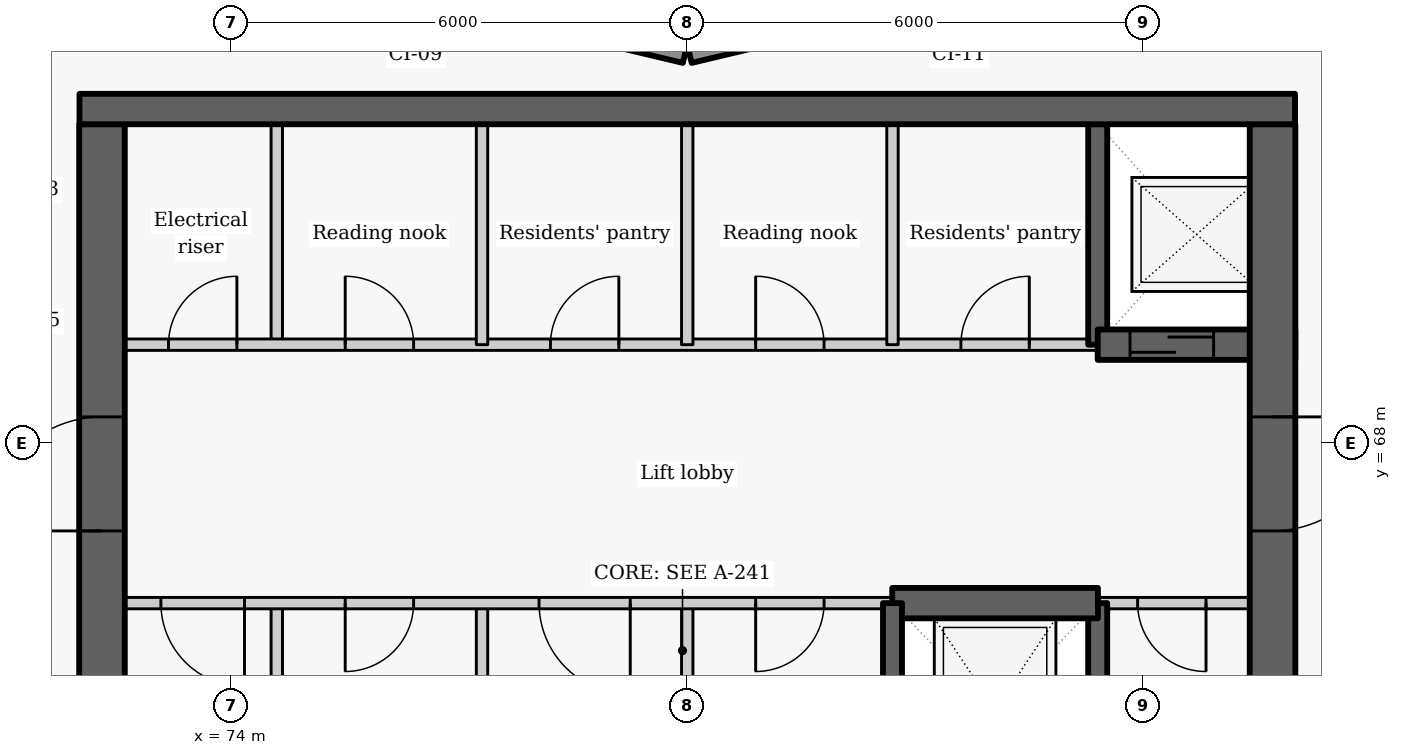
"""IFC4 building model, lengths in metres.
Left out: names, types, materials, properties, quantities, classifications, styles, units other than length and angle.
Written with IfcOpenShell. Run it as: python <this file> out.ifc"""

import sys

from ifc_helpers import new_model, si_unit, direction, frame, frame_2d, origin, place, context, subcontext, project, spatial, rectangle, extrude, element, fill, save


model = new_model("IFC4")
c1 = context("Model", 3, precision=1e-05, world=origin(), true_north=direction((0.0, 1.0)))
c2 = subcontext(c1, "Body", "Model", "MODEL_VIEW")
j1 = project(units=[si_unit("LENGTHUNIT", "METRE"), si_unit("PLANEANGLEUNIT", "RADIAN")], contexts=[c1])
p1 = place(None, origin())
s1 = spatial("IfcSite", under=j1, at=p1, CompositionType="ELEMENT")
p2 = place(p1, origin())
s2 = spatial("IfcBuilding", under=s1, at=p2, CompositionType="ELEMENT")
p3 = place(p2, frame((0.0, 0.0, 239.4)))
s3 = spatial("IfcBuildingStorey", under=s2, at=p3, CompositionType="ELEMENT", Elevation=239.4)
for number, where, z_axis, x_axis in (
    (1, (83.186, 73.881, 0.0), (0.0, 0.0, 1.0), (-0.973, -0.232, 0.0)),
    (2, (79.971, 73.128, 0.0), (0.0, 0.0, 1.0), (-0.973, 0.232, 0.0)),
):
    element("IfcWall", number, at=place(p3, frame(where, z_axis=z_axis, x_axis=x_axis)), inside=s3, PredefinedType="SOLIDWALL", context=c2, shape_type="SweptSolid", body=[
        extrude(rectangle(XDim=3.246, YDim=0.25, at=frame_2d((1.623, 0.0))), origin(), (0.0, 0.0, 1.0), 2.425),
    ])
p4 = place(p3, frame((74.6, 63.1, 0.0), z_axis=(0.0, 0.0, 1.0), x_axis=(0.0, 1.0, 0.0)))
e3 = element("IfcWall", 3, at=p4, inside=s3, PredefinedType="PARTITIONING", context=c2, shape_type="SweptSolid", body=[
    extrude(rectangle(XDim=2.8, YDim=0.15, at=frame_2d((1.4, 0.0))), origin(), (0.0, 0.0, 1.0), 3.025),
])
p5 = place(p3, frame((74.6, 69.3, 0.0), z_axis=(0.0, 0.0, 1.0), x_axis=(0.0, 1.0, 0.0)))
e4 = element("IfcWall", 4, at=p5, inside=s3, PredefinedType="PARTITIONING", context=c2, shape_type="SweptSolid", body=[
    extrude(rectangle(XDim=2.9, YDim=0.15, at=frame_2d((1.45, 0.0))), origin(), (0.0, 0.0, 1.0), 3.025),
])
p6 = place(p3, frame((72.0, 69.3, 0.0), z_axis=(0.0, 0.0, 1.0), x_axis=(1.0, 0.0, 0.0)))
e5 = element("IfcWall", 5, at=p6, inside=s3, PredefinedType="PARTITIONING", context=c2, shape_type="SweptSolid", body=[
    extrude(rectangle(XDim=13.4, YDim=0.15, at=frame_2d((6.7, 0.0))), origin(), (0.0, 0.0, 1.0), 3.025),
])
p7 = place(p6, frame((1.175, 0.0, 0.0)))
e6 = element("IfcOpeningElement", 6, at=p7, cuts=e5, PredefinedType="OPENING", context=c2, shape_type="SweptSolid", body=[
    extrude(rectangle(XDim=0.9, YDim=2.1, at=frame_2d((0.45, 1.05))), frame((0.0, 0.085, 0.0), z_axis=(0.0, -1.0, 0.0), x_axis=(1.0, 0.0, 0.0)), (0.0, 0.0, 1.0), 0.17),
])
p8 = place(p6, frame((3.5, 0.0, 0.0)))
e7 = element("IfcOpeningElement", 7, at=p8, cuts=e5, PredefinedType="OPENING", context=c2, shape_type="SweptSolid", body=[
    extrude(rectangle(XDim=0.9, YDim=2.1, at=frame_2d((0.45, 1.05))), frame((0.0, 0.085, 0.0), z_axis=(0.0, -1.0, 0.0), x_axis=(1.0, 0.0, 0.0)), (0.0, 0.0, 1.0), 0.17),
])
p9 = place(p6, frame((6.2, 0.0, 0.0)))
e8 = element("IfcOpeningElement", 8, at=p9, cuts=e5, PredefinedType="OPENING", context=c2, shape_type="SweptSolid", body=[
    extrude(rectangle(XDim=0.9, YDim=2.1, at=frame_2d((0.45, 1.05))), frame((0.0, 0.085, 0.0), z_axis=(0.0, -1.0, 0.0), x_axis=(1.0, 0.0, 0.0)), (0.0, 0.0, 1.0), 0.17),
])
p10 = place(p6, frame((8.9, 0.0, 0.0)))
e9 = element("IfcOpeningElement", 9, at=p10, cuts=e5, PredefinedType="OPENING", context=c2, shape_type="SweptSolid", body=[
    extrude(rectangle(XDim=0.9, YDim=2.1, at=frame_2d((0.45, 1.05))), frame((0.0, 0.085, 0.0), z_axis=(0.0, -1.0, 0.0), x_axis=(1.0, 0.0, 0.0)), (0.0, 0.0, 1.0), 0.17),
])
p11 = place(p6, frame((11.6, 0.0, 0.0)))
e10 = element("IfcOpeningElement", 10, at=p11, cuts=e5, PredefinedType="OPENING", context=c2, shape_type="SweptSolid", body=[
    extrude(rectangle(XDim=0.9, YDim=2.1, at=frame_2d((0.45, 1.05))), frame((0.0, 0.085, 0.0), z_axis=(0.0, -1.0, 0.0), x_axis=(1.0, 0.0, 0.0)), (0.0, 0.0, 1.0), 0.17),
])
p12 = place(p3, frame((72.3, 63.1, -0.275), z_axis=(0.0, 0.0, 1.0), x_axis=(0.0, 1.0, 0.0)))
e11 = element("IfcWall", 11, at=p12, inside=s3, PredefinedType="SHEAR", context=c2, shape_type="SweptSolid", body=[
    extrude(rectangle(XDim=9.1, YDim=0.6, at=frame_2d((4.55, 0.0))), origin(), (0.0, 0.0, 1.0), 3.3),
])
p13 = place(p12, frame((3.75, 0.0, 0.275)))
e12 = element("IfcOpeningElement", 12, at=p13, cuts=e11, PredefinedType="OPENING", context=c2, shape_type="SweptSolid", body=[
    extrude(rectangle(XDim=1.5, YDim=2.1, at=frame_2d((0.75, 1.05))), frame((0.0, 0.31, 0.0), z_axis=(0.0, -1.0, 0.0), x_axis=(1.0, 0.0, 0.0)), (0.0, 0.0, 1.0), 0.62),
])
p14 = place(p3, frame((85.4, 63.1, -0.275), z_axis=(0.0, 0.0, 1.0), x_axis=(0.0, 1.0, 0.0)))
e13 = element("IfcWall", 13, at=p14, inside=s3, PredefinedType="SHEAR", context=c2, shape_type="SweptSolid", body=[
    extrude(rectangle(XDim=2.8, YDim=0.25, at=frame_2d((1.4, 0.0))), origin(), (0.0, 0.0, 1.0), 3.3),
])
p15 = place(p3, frame((85.4, 69.3, -0.275), z_axis=(0.0, 0.0, 1.0), x_axis=(0.0, 1.0, 0.0)))
e14 = element("IfcWall", 14, at=p15, inside=s3, PredefinedType="SHEAR", context=c2, shape_type="SweptSolid", body=[
    extrude(rectangle(XDim=2.9, YDim=0.25, at=frame_2d((1.45, 0.0))), origin(), (0.0, 0.0, 1.0), 3.3),
])
p16 = place(p3, frame((85.4, 69.3, -0.275), z_axis=(0.0, 0.0, 1.0), x_axis=(1.0, 0.0, 0.0)))
e15 = element("IfcWall", 15, at=p16, inside=s3, PredefinedType="SHEAR", context=c2, shape_type="SweptSolid", body=[
    extrude(rectangle(XDim=2.6, YDim=0.4, at=frame_2d((1.3, 0.0))), origin(), (0.0, 0.0, 1.0), 3.3),
])
p17 = place(p16, frame((0.425, 0.0, 0.275)))
e16 = element("IfcOpeningElement", 16, at=p17, cuts=e15, PredefinedType="OPENING", context=c2, shape_type="SweptSolid", body=[
    extrude(rectangle(XDim=1.1, YDim=2.1, at=frame_2d((0.55, 1.05))), frame((0.0, 0.21, 0.0), z_axis=(0.0, -1.0, 0.0), x_axis=(1.0, 0.0, 0.0)), (0.0, 0.0, 1.0), 0.42),
])
p18 = place(p3, frame((87.7, 72.2, -0.275), z_axis=(0.0, 0.0, 1.0), x_axis=(0.0, -1.0, 0.0)))
e17 = element("IfcWall", 17, at=p18, inside=s3, PredefinedType="SHEAR", context=c2, shape_type="SweptSolid", body=[
    extrude(rectangle(XDim=14.25, YDim=0.6, at=frame_2d((7.125, 0.0))), origin(), (0.0, 0.0, 1.0), 3.3),
])
p19 = place(p18, frame((3.85, 0.0, 0.275)))
e18 = element("IfcOpeningElement", 18, at=p19, cuts=e17, PredefinedType="OPENING", context=c2, shape_type="SweptSolid", body=[
    extrude(rectangle(XDim=1.5, YDim=2.1, at=frame_2d((0.75, 1.05))), frame((0.0, 0.31, 0.0), z_axis=(0.0, -1.0, 0.0), x_axis=(1.0, 0.0, 0.0)), (0.0, 0.0, 1.0), 0.62),
])
p20 = place(p18, frame((11.125, 0.0, 0.275)))
e19 = element("IfcOpeningElement", 19, at=p20, cuts=e17, PredefinedType="OPENING", context=c2, shape_type="SweptSolid", body=[
    extrude(rectangle(XDim=1.1, YDim=2.1, at=frame_2d((0.55, 1.05))), frame((0.0, 0.31, 0.0), z_axis=(0.0, -1.0, 0.0), x_axis=(1.0, 0.0, 0.0)), (0.0, 0.0, 1.0), 0.62),
])
p21 = place(p3, frame((77.3, 63.1, 0.0), z_axis=(0.0, 0.0, 1.0), x_axis=(0.0, 1.0, 0.0)))
e20 = element("IfcWall", 20, at=p21, inside=s3, PredefinedType="PARTITIONING", context=c2, shape_type="SweptSolid", body=[
    extrude(rectangle(XDim=2.8, YDim=0.15, at=frame_2d((1.4, 0.0))), origin(), (0.0, 0.0, 1.0), 3.025),
])
p22 = place(p3, frame((77.3, 69.3, 0.0), z_axis=(0.0, 0.0, 1.0), x_axis=(0.0, 1.0, 0.0)))
e21 = element("IfcWall", 21, at=p22, inside=s3, PredefinedType="PARTITIONING", context=c2, shape_type="SweptSolid", body=[
    extrude(rectangle(XDim=2.9, YDim=0.15, at=frame_2d((1.45, 0.0))), origin(), (0.0, 0.0, 1.0), 3.025),
])
p23 = place(p3, frame((80.0, 63.1, 0.0), z_axis=(0.0, 0.0, 1.0), x_axis=(0.0, 1.0, 0.0)))
e22 = element("IfcWall", 22, at=p23, inside=s3, PredefinedType="PARTITIONING", context=c2, shape_type="SweptSolid", body=[
    extrude(rectangle(XDim=2.8, YDim=0.15, at=frame_2d((1.4, 0.0))), origin(), (0.0, 0.0, 1.0), 3.025),
])
for number, where, z_axis, x_axis in (
    (23, (80.0, 69.3, 0.0), (0.0, 0.0, 1.0), (0.0, 1.0, 0.0)),
    (24, (82.7, 69.3, 0.0), (0.0, 0.0, 1.0), (0.0, 1.0, 0.0)),
):
    element("IfcWall", number, at=place(p3, frame(where, z_axis=z_axis, x_axis=x_axis)), inside=s3, PredefinedType="PARTITIONING", context=c2, shape_type="SweptSolid", body=[
        extrude(rectangle(XDim=2.9, YDim=0.15, at=frame_2d((1.45, 0.0))), origin(), (0.0, 0.0, 1.0), 3.025),
    ])
p24 = place(p3, frame((82.703, 65.9, 0.0), z_axis=(0.0, 0.0, 1.0), x_axis=(-1.0, 0.0, 0.0)))
e25 = element("IfcWall", 25, at=p24, inside=s3, PredefinedType="PARTITIONING", context=c2, shape_type="SweptSolid", body=[
    extrude(rectangle(XDim=10.703, YDim=0.15, at=frame_2d((5.352, 0.0))), origin(), (0.0, 0.0, 1.0), 3.025),
])
p25 = place(p24, frame((8.528, 0.0, 0.0)))
e26 = element("IfcOpeningElement", 26, at=p25, cuts=e25, PredefinedType="OPENING", context=c2, shape_type="SweptSolid", body=[
    extrude(rectangle(XDim=1.1, YDim=2.1, at=frame_2d((0.55, 1.05))), frame((0.0, 0.085, 0.0), z_axis=(0.0, -1.0, 0.0), x_axis=(1.0, 0.0, 0.0)), (0.0, 0.0, 1.0), 0.17),
])
p26 = place(p24, frame((6.303, 0.0, 0.0)))
e27 = element("IfcOpeningElement", 27, at=p26, cuts=e25, PredefinedType="OPENING", context=c2, shape_type="SweptSolid", body=[
    extrude(rectangle(XDim=0.9, YDim=2.1, at=frame_2d((0.45, 1.05))), frame((0.0, 0.085, 0.0), z_axis=(0.0, -1.0, 0.0), x_axis=(1.0, 0.0, 0.0)), (0.0, 0.0, 1.0), 0.17),
])
p27 = place(p24, frame((3.453, 0.0, 0.0)))
e28 = element("IfcOpeningElement", 28, at=p27, cuts=e25, PredefinedType="OPENING", context=c2, shape_type="SweptSolid", body=[
    extrude(rectangle(XDim=1.2, YDim=2.1, at=frame_2d((0.6, 1.05))), frame((0.0, 0.085, 0.0), z_axis=(0.0, -1.0, 0.0), x_axis=(1.0, 0.0, 0.0)), (0.0, 0.0, 1.0), 0.17),
])
p28 = place(p24, frame((0.903, 0.0, 0.0)))
e29 = element("IfcOpeningElement", 29, at=p28, cuts=e25, PredefinedType="OPENING", context=c2, shape_type="SweptSolid", body=[
    extrude(rectangle(XDim=0.9, YDim=2.1, at=frame_2d((0.45, 1.05))), frame((0.0, 0.085, 0.0), z_axis=(0.0, -1.0, 0.0), x_axis=(1.0, 0.0, 0.0)), (0.0, 0.0, 1.0), 0.17),
])
p29 = place(p3, frame((88.0, 65.9, 0.0), z_axis=(0.0, 0.0, 1.0), x_axis=(-1.0, 0.0, 0.0)))
e30 = element("IfcWall", 30, at=p29, inside=s3, PredefinedType="PARTITIONING", context=c2, shape_type="SweptSolid", body=[
    extrude(rectangle(XDim=2.603, YDim=0.15, at=frame_2d((1.302, 0.0))), origin(), (0.0, 0.0, 1.0), 3.025),
])
p30 = place(p29, frame((1.175, 0.0, 0.0)))
e31 = element("IfcOpeningElement", 31, at=p30, cuts=e30, PredefinedType="OPENING", context=c2, shape_type="SweptSolid", body=[
    extrude(rectangle(XDim=0.9, YDim=2.1, at=frame_2d((0.45, 1.05))), frame((0.0, 0.085, 0.0), z_axis=(0.0, -1.0, 0.0), x_axis=(1.0, 0.0, 0.0)), (0.0, 0.0, 1.0), 0.17),
])
p31 = place(p3, frame((82.697, 65.9, -0.275), z_axis=(0.0, 0.0, 1.0), x_axis=(1.0, 0.0, 0.0)))
e32 = element("IfcWall", 32, at=p31, inside=s3, PredefinedType="SHEAR", context=c2, shape_type="SweptSolid", body=[
    extrude(rectangle(XDim=2.706, YDim=0.4, at=frame_2d((1.353, 0.0))), origin(), (0.0, 0.0, 1.0), 3.3),
])
p32 = place(p3, frame((82.7, 63.1, -0.275), z_axis=(0.0, 0.0, 1.0), x_axis=(0.0, 1.0, 0.0)))
e33 = element("IfcWall", 33, at=p32, inside=s3, PredefinedType="SHEAR", context=c2, shape_type="SweptSolid", body=[
    extrude(rectangle(XDim=2.8, YDim=0.25, at=frame_2d((1.4, 0.0))), origin(), (0.0, 0.0, 1.0), 3.3),
])
p33 = place(p3, frame((72.004, 72.4, -0.275), z_axis=(0.0, 0.0, 1.0), x_axis=(1.0, 0.0, 0.0)))
e34 = element("IfcWall", 34, at=p33, inside=s3, PredefinedType="SHEAR", context=c2, shape_type="SweptSolid", body=[
    extrude(rectangle(XDim=15.992, YDim=0.4, at=frame_2d((7.996, 0.0))), origin(), (0.0, 0.0, 1.0), 3.3),
])
p34 = place(p7, origin())
e35 = element("IfcDoor", 35, at=p34, inside=s3, OperationType="SINGLE_SWING_RIGHT", PredefinedType="DOOR", context=c2, shape_type="SweptSolid", body=[
    extrude(rectangle(XDim=0.9, YDim=2.1, at=frame_2d((0.45, 1.05))), frame((0.0, 0.025, 0.0), z_axis=(0.0, -1.0, 0.0), x_axis=(1.0, 0.0, 0.0)), (0.0, 0.0, 1.0), 0.05),
])
fill(e6, e35)
p35 = place(p17, origin())
e36 = element("IfcDoor", 36, at=p35, inside=s3, OperationType="SLIDING_TO_LEFT", PredefinedType="DOOR", context=c2, shape_type="SweptSolid", body=[
    extrude(rectangle(XDim=1.1, YDim=2.1, at=frame_2d((0.55, 1.05))), frame((0.0, 0.025, 0.0), z_axis=(0.0, -1.0, 0.0), x_axis=(1.0, 0.0, 0.0)), (0.0, 0.0, 1.0), 0.05),
])
fill(e16, e36)
p36 = place(p8, origin())
e37 = element("IfcDoor", 37, at=p36, inside=s3, OperationType="SINGLE_SWING_LEFT", PredefinedType="DOOR", context=c2, shape_type="SweptSolid", body=[
    extrude(rectangle(XDim=0.9, YDim=2.1, at=frame_2d((0.45, 1.05))), frame((0.0, 0.025, 0.0), z_axis=(0.0, -1.0, 0.0), x_axis=(1.0, 0.0, 0.0)), (0.0, 0.0, 1.0), 0.05),
])
fill(e7, e37)
p37 = place(p9, origin())
e38 = element("IfcDoor", 38, at=p37, inside=s3, OperationType="SINGLE_SWING_RIGHT", PredefinedType="DOOR", context=c2, shape_type="SweptSolid", body=[
    extrude(rectangle(XDim=0.9, YDim=2.1, at=frame_2d((0.45, 1.05))), frame((0.0, 0.025, 0.0), z_axis=(0.0, -1.0, 0.0), x_axis=(1.0, 0.0, 0.0)), (0.0, 0.0, 1.0), 0.05),
])
fill(e8, e38)
p38 = place(p10, origin())
e39 = element("IfcDoor", 39, at=p38, inside=s3, OperationType="SINGLE_SWING_LEFT", PredefinedType="DOOR", context=c2, shape_type="SweptSolid", body=[
    extrude(rectangle(XDim=0.9, YDim=2.1, at=frame_2d((0.45, 1.05))), frame((0.0, 0.025, 0.0), z_axis=(0.0, -1.0, 0.0), x_axis=(1.0, 0.0, 0.0)), (0.0, 0.0, 1.0), 0.05),
])
fill(e9, e39)
p39 = place(p11, origin())
e40 = element("IfcDoor", 40, at=p39, inside=s3, OperationType="SINGLE_SWING_RIGHT", PredefinedType="DOOR", context=c2, shape_type="SweptSolid", body=[
    extrude(rectangle(XDim=0.9, YDim=2.1, at=frame_2d((0.45, 1.05))), frame((0.0, 0.025, 0.0), z_axis=(0.0, -1.0, 0.0), x_axis=(1.0, 0.0, 0.0)), (0.0, 0.0, 1.0), 0.05),
])
fill(e10, e40)
p40 = place(p25, origin())
e41 = element("IfcDoor", 41, at=p40, inside=s3, OperationType="SINGLE_SWING_LEFT", PredefinedType="DOOR", context=c2, shape_type="SweptSolid", body=[
    extrude(rectangle(XDim=1.1, YDim=2.1, at=frame_2d((0.55, 1.05))), frame((0.0, 0.025, 0.0), z_axis=(0.0, -1.0, 0.0), x_axis=(1.0, 0.0, 0.0)), (0.0, 0.0, 1.0), 0.05),
])
fill(e26, e41)
p41 = place(p26, origin())
e42 = element("IfcDoor", 42, at=p41, inside=s3, OperationType="SINGLE_SWING_RIGHT", PredefinedType="DOOR", context=c2, shape_type="SweptSolid", body=[
    extrude(rectangle(XDim=0.9, YDim=2.1, at=frame_2d((0.45, 1.05))), frame((0.0, 0.025, 0.0), z_axis=(0.0, -1.0, 0.0), x_axis=(1.0, 0.0, 0.0)), (0.0, 0.0, 1.0), 0.05),
])
fill(e27, e42)
p42 = place(p27, origin())
e43 = element("IfcDoor", 43, at=p42, inside=s3, OperationType="DOUBLE_DOOR_SINGLE_SWING", PredefinedType="DOOR", context=c2, shape_type="SweptSolid", body=[
    extrude(rectangle(XDim=1.2, YDim=2.1, at=frame_2d((0.6, 1.05))), frame((0.0, 0.025, 0.0), z_axis=(0.0, -1.0, 0.0), x_axis=(1.0, 0.0, 0.0)), (0.0, 0.0, 1.0), 0.05),
])
fill(e28, e43)
p43 = place(p28, origin())
e44 = element("IfcDoor", 44, at=p43, inside=s3, OperationType="SINGLE_SWING_RIGHT", PredefinedType="DOOR", context=c2, shape_type="SweptSolid", body=[
    extrude(rectangle(XDim=0.9, YDim=2.1, at=frame_2d((0.45, 1.05))), frame((0.0, 0.025, 0.0), z_axis=(0.0, -1.0, 0.0), x_axis=(1.0, 0.0, 0.0)), (0.0, 0.0, 1.0), 0.05),
])
fill(e29, e44)
p44 = place(p30, origin())
e45 = element("IfcDoor", 45, at=p44, inside=s3, OperationType="SINGLE_SWING_LEFT", PredefinedType="DOOR", context=c2, shape_type="SweptSolid", body=[
    extrude(rectangle(XDim=0.9, YDim=2.1, at=frame_2d((0.45, 1.05))), frame((0.0, 0.025, 0.0), z_axis=(0.0, -1.0, 0.0), x_axis=(1.0, 0.0, 0.0)), (0.0, 0.0, 1.0), 0.05),
])
fill(e31, e45)
p45 = place(p19, origin())
e46 = element("IfcDoor", 46, at=p45, inside=s3, OperationType="DOUBLE_DOOR_SINGLE_SWING", PredefinedType="DOOR", context=c2, shape_type="SweptSolid", body=[
    extrude(rectangle(XDim=1.5, YDim=2.1, at=frame_2d((0.75, 1.05))), frame((0.0, 0.025, 0.0), z_axis=(0.0, -1.0, 0.0), x_axis=(1.0, 0.0, 0.0)), (0.0, 0.0, 1.0), 0.05),
])
fill(e18, e46)
p46 = place(p13, origin())
e47 = element("IfcDoor", 47, at=p46, inside=s3, OperationType="DOUBLE_DOOR_SINGLE_SWING", PredefinedType="DOOR", context=c2, shape_type="SweptSolid", body=[
    extrude(rectangle(XDim=1.5, YDim=2.1, at=frame_2d((0.75, 1.05))), frame((0.0, 0.025, 0.0), z_axis=(0.0, -1.0, 0.0), x_axis=(1.0, 0.0, 0.0)), (0.0, 0.0, 1.0), 0.05),
])
fill(e12, e47)
save(model, sys.argv[1])
